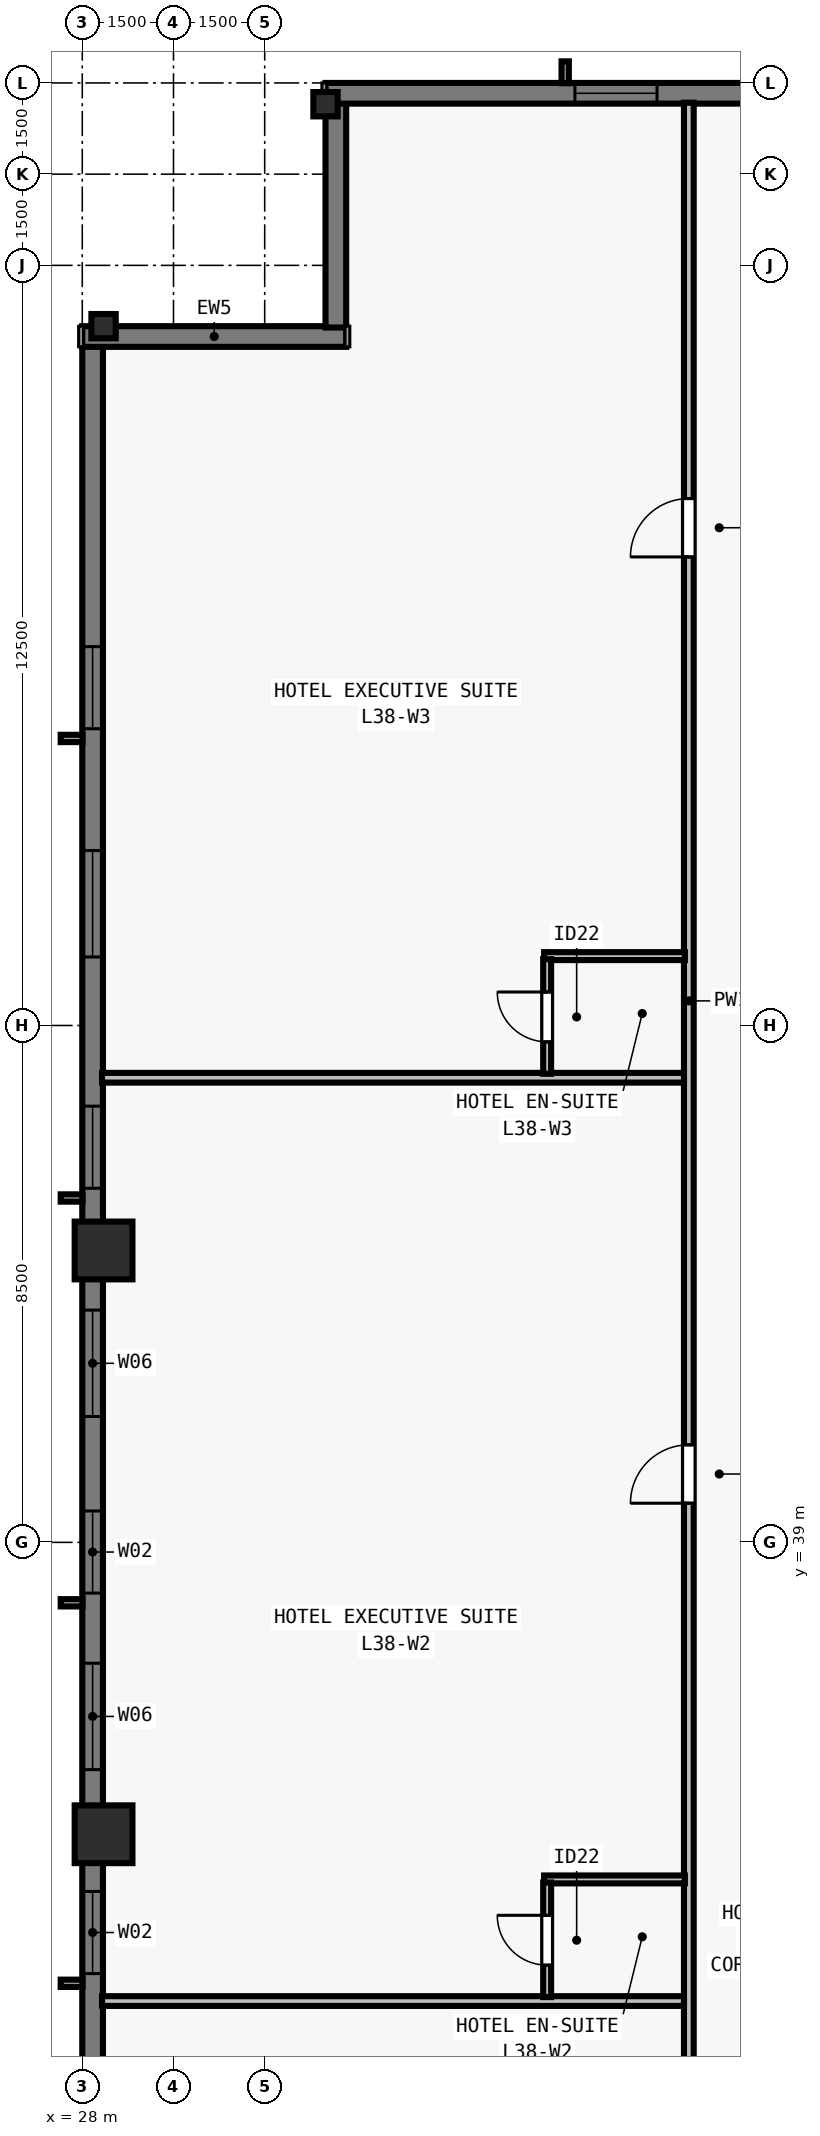
"""IFC4 building model, lengths in metres.
Left out: names, types, materials, properties, quantities, classifications, styles, units other than length and angle.
Written with IfcOpenShell. Run it as: python <this file> out.ifc"""

import sys

from ifc_helpers import new_model, si_unit, direction, frame, frame_2d, origin, origin_2d, place, context, subcontext, project, spatial, rectangle, i_section, extrude, element, fill, save


model = new_model("IFC4")
c1 = context("Model", 3, precision=1e-05, world=origin(), true_north=direction((0.0, 1.0)))
c2 = subcontext(c1, "Body", "Model", "MODEL_VIEW")
j1 = project(units=[si_unit("LENGTHUNIT", "METRE"), si_unit("PLANEANGLEUNIT", "RADIAN")], contexts=[c1])
p1 = place(None, origin())
s1 = spatial("IfcSite", under=j1, at=p1, CompositionType="ELEMENT")
p2 = place(p1, origin())
s2 = spatial("IfcBuilding", under=s1, at=p2, CompositionType="ELEMENT")
p3 = place(p2, frame((0.0, 0.0, 141.0)))
s3 = spatial("IfcBuildingStorey", under=s2, at=p3, CompositionType="ELEMENT", Elevation=141.0)
for number, where, z_axis, x_axis in (
    (1, (32.0, 62.65, 0.0), (0.0, 0.0, 1.0), (1.0, 0.0, 0.0)),
    (2, (28.35, 59.0, 0.0), (0.0, 0.0, 1.0), (0.0, 1.0, 0.0)),
):
    element("IfcColumn", number, at=place(p3, frame(where, z_axis=z_axis, x_axis=x_axis)), inside=s3, PredefinedType="COLUMN", context=c2, shape_type="SweptSolid", body=[
        extrude(i_section(OverallWidth=0.4, OverallDepth=0.4, WebThickness=0.022, FlangeThickness=0.036, at=origin_2d()), origin(), (0.0, 0.0, 1.0), 3.5),
    ])
for number, where, z_axis, x_axis in (
    (3, (28.35, 43.8, 0.0), (0.0, 0.0, 1.0), (0.0, 1.0, 0.0)),
    (4, (28.35, 34.2, 0.0), (0.0, 0.0, 1.0), (0.0, 1.0, 0.0)),
):
    element("IfcColumn", number, at=place(p3, frame(where, z_axis=z_axis, x_axis=x_axis)), inside=s3, PredefinedType="COLUMN", context=c2, shape_type="SweptSolid", body=[
        extrude(rectangle(XDim=0.95, YDim=0.95, at=origin_2d()), origin(), (0.0, 0.0, 1.0), 3.5),
    ])
p4 = place(p3, frame((28.17, 19.0, 0.0), z_axis=(0.0, 0.0, 1.0), x_axis=(0.0, 1.0, 0.0)))
e5 = element("IfcWall", 5, at=p4, inside=s3, PredefinedType="SOLIDWALL", context=c2, shape_type="SweptSolid", body=[
    extrude(rectangle(XDim=39.682, YDim=0.34, at=frame_2d((19.841, 0.0))), origin(), (0.0, 0.0, 1.0), 3.28),
])
p5 = place(p4, frame((4.952, 0.0, 0.8)))
e6 = element("IfcOpeningElement", 6, at=p5, cuts=e5, PredefinedType="OPENING", context=c2, shape_type="SweptSolid", body=[
    extrude(rectangle(XDim=1.35, YDim=1.66, at=frame_2d((0.675, 0.83))), frame((0.0, 0.18, 0.0), z_axis=(0.0, -1.0, 0.0), x_axis=(1.0, 0.0, 0.0)), (0.0, 0.0, 1.0), 0.36),
])
p6 = place(p4, frame((8.305, 0.0, 0.8)))
e7 = element("IfcOpeningElement", 7, at=p6, cuts=e5, PredefinedType="OPENING", context=c2, shape_type="SweptSolid", body=[
    extrude(rectangle(XDim=1.75, YDim=1.66, at=frame_2d((0.875, 0.83))), frame((0.0, 0.18, 0.0), z_axis=(0.0, -1.0, 0.0), x_axis=(1.0, 0.0, 0.0)), (0.0, 0.0, 1.0), 0.36),
])
p7 = place(p4, frame((12.909, 0.0, 0.8)))
e8 = element("IfcOpeningElement", 8, at=p7, cuts=e5, PredefinedType="OPENING", context=c2, shape_type="SweptSolid", body=[
    extrude(rectangle(XDim=1.35, YDim=1.66, at=frame_2d((0.675, 0.83))), frame((0.0, 0.18, 0.0), z_axis=(0.0, -1.0, 0.0), x_axis=(1.0, 0.0, 0.0)), (0.0, 0.0, 1.0), 0.36),
])
p8 = place(p4, frame((16.262, 0.0, 0.8)))
e9 = element("IfcOpeningElement", 9, at=p8, cuts=e5, PredefinedType="OPENING", context=c2, shape_type="SweptSolid", body=[
    extrude(rectangle(XDim=1.75, YDim=1.66, at=frame_2d((0.875, 0.83))), frame((0.0, 0.18, 0.0), z_axis=(0.0, -1.0, 0.0), x_axis=(1.0, 0.0, 0.0)), (0.0, 0.0, 1.0), 0.36),
])
p9 = place(p4, frame((19.166, 0.0, 0.8)))
e10 = element("IfcOpeningElement", 10, at=p9, cuts=e5, PredefinedType="OPENING", context=c2, shape_type="SweptSolid", body=[
    extrude(rectangle(XDim=1.35, YDim=1.66, at=frame_2d((0.675, 0.83))), frame((0.0, 0.18, 0.0), z_axis=(0.0, -1.0, 0.0), x_axis=(1.0, 0.0, 0.0)), (0.0, 0.0, 1.0), 0.36),
])
p10 = place(p4, frame((22.07, 0.0, 0.8)))
e11 = element("IfcOpeningElement", 11, at=p10, cuts=e5, PredefinedType="OPENING", context=c2, shape_type="SweptSolid", body=[
    extrude(rectangle(XDim=1.75, YDim=1.66, at=frame_2d((0.875, 0.83))), frame((0.0, 0.18, 0.0), z_axis=(0.0, -1.0, 0.0), x_axis=(1.0, 0.0, 0.0)), (0.0, 0.0, 1.0), 0.36),
])
p11 = place(p4, frame((25.823, 0.0, 0.8)))
e12 = element("IfcOpeningElement", 12, at=p11, cuts=e5, PredefinedType="OPENING", context=c2, shape_type="SweptSolid", body=[
    extrude(rectangle(XDim=1.35, YDim=1.66, at=frame_2d((0.675, 0.83))), frame((0.0, 0.18, 0.0), z_axis=(0.0, -1.0, 0.0), x_axis=(1.0, 0.0, 0.0)), (0.0, 0.0, 1.0), 0.36),
])
p12 = place(p4, frame((29.627, 0.0, 0.8)))
e13 = element("IfcOpeningElement", 13, at=p12, cuts=e5, PredefinedType="OPENING", context=c2, shape_type="SweptSolid", body=[
    extrude(rectangle(XDim=1.75, YDim=1.66, at=frame_2d((0.875, 0.83))), frame((0.0, 0.18, 0.0), z_axis=(0.0, -1.0, 0.0), x_axis=(1.0, 0.0, 0.0)), (0.0, 0.0, 1.0), 0.36),
])
p13 = place(p4, frame((33.38, 0.0, 0.8)))
e14 = element("IfcOpeningElement", 14, at=p13, cuts=e5, PredefinedType="OPENING", context=c2, shape_type="SweptSolid", body=[
    extrude(rectangle(XDim=1.35, YDim=1.66, at=frame_2d((0.675, 0.83))), frame((0.0, 0.18, 0.0), z_axis=(0.0, -1.0, 0.0), x_axis=(1.0, 0.0, 0.0)), (0.0, 0.0, 1.0), 0.36),
])
p14 = place(p3, frame((28.0, 58.83, 0.0), z_axis=(0.0, 0.0, 1.0), x_axis=(1.0, 0.0, 0.0)))
e15 = element("IfcWall", 15, at=p14, inside=s3, PredefinedType="SOLIDWALL", context=c2, shape_type="SweptSolid", body=[
    extrude(rectangle(XDim=4.34, YDim=0.34, at=frame_2d((2.17, 0.0))), origin(), (0.0, 0.0, 1.0), 3.28),
])
p15 = place(p3, frame((32.17, 58.978, 0.0), z_axis=(0.0, 0.0, 1.0), x_axis=(0.0, 1.0, 0.0)))
e16 = element("IfcWall", 16, at=p15, inside=s3, PredefinedType="SOLIDWALL", context=c2, shape_type="SweptSolid", body=[
    extrude(rectangle(XDim=3.704, YDim=0.34, at=frame_2d((1.852, 0.0))), origin(), (0.0, 0.0, 1.0), 3.28),
])
p16 = place(p3, frame((32.0, 62.83, 0.0), z_axis=(0.0, 0.0, 1.0), x_axis=(1.0, 0.0, 0.0)))
e17 = element("IfcWall", 17, at=p16, inside=s3, PredefinedType="SOLIDWALL", context=c2, shape_type="SweptSolid", body=[
    extrude(rectangle(XDim=39.682, YDim=0.34, at=frame_2d((19.841, 0.0))), origin(), (0.0, 0.0, 1.0), 3.28),
])
p17 = place(p16, frame((4.102, 0.0, 0.8)))
e18 = element("IfcOpeningElement", 18, at=p17, cuts=e17, PredefinedType="OPENING", context=c2, shape_type="SweptSolid", body=[
    extrude(rectangle(XDim=1.35, YDim=1.66, at=frame_2d((0.675, 0.83))), frame((0.0, 0.18, 0.0), z_axis=(0.0, -1.0, 0.0), x_axis=(1.0, 0.0, 0.0)), (0.0, 0.0, 1.0), 0.36),
])
p18 = place(p16, frame((8.755, 0.0, 0.8)))
e19 = element("IfcOpeningElement", 19, at=p18, cuts=e17, PredefinedType="OPENING", context=c2, shape_type="SweptSolid", body=[
    extrude(rectangle(XDim=1.75, YDim=1.66, at=frame_2d((0.875, 0.83))), frame((0.0, 0.18, 0.0), z_axis=(0.0, -1.0, 0.0), x_axis=(1.0, 0.0, 0.0)), (0.0, 0.0, 1.0), 0.36),
])
p19 = place(p16, frame((12.059, 0.0, 0.8)))
e20 = element("IfcOpeningElement", 20, at=p19, cuts=e17, PredefinedType="OPENING", context=c2, shape_type="SweptSolid", body=[
    extrude(rectangle(XDim=1.35, YDim=1.66, at=frame_2d((0.675, 0.83))), frame((0.0, 0.18, 0.0), z_axis=(0.0, -1.0, 0.0), x_axis=(1.0, 0.0, 0.0)), (0.0, 0.0, 1.0), 0.36),
])
p20 = place(p16, frame((16.262, 0.0, 0.8)))
e21 = element("IfcOpeningElement", 21, at=p20, cuts=e17, PredefinedType="OPENING", context=c2, shape_type="SweptSolid", body=[
    extrude(rectangle(XDim=1.75, YDim=1.66, at=frame_2d((0.875, 0.83))), frame((0.0, 0.18, 0.0), z_axis=(0.0, -1.0, 0.0), x_axis=(1.0, 0.0, 0.0)), (0.0, 0.0, 1.0), 0.36),
])
p21 = place(p16, frame((18.316, 0.0, 0.8)))
e22 = element("IfcOpeningElement", 22, at=p21, cuts=e17, PredefinedType="OPENING", context=c2, shape_type="SweptSolid", body=[
    extrude(rectangle(XDim=1.35, YDim=1.66, at=frame_2d((0.675, 0.83))), frame((0.0, 0.18, 0.0), z_axis=(0.0, -1.0, 0.0), x_axis=(1.0, 0.0, 0.0)), (0.0, 0.0, 1.0), 0.36),
])
p22 = place(p16, frame((22.07, 0.0, 0.8)))
e23 = element("IfcOpeningElement", 23, at=p22, cuts=e17, PredefinedType="OPENING", context=c2, shape_type="SweptSolid", body=[
    extrude(rectangle(XDim=1.75, YDim=1.66, at=frame_2d((0.875, 0.83))), frame((0.0, 0.18, 0.0), z_axis=(0.0, -1.0, 0.0), x_axis=(1.0, 0.0, 0.0)), (0.0, 0.0, 1.0), 0.36),
])
p23 = place(p16, frame((26.273, 0.0, 0.8)))
e24 = element("IfcOpeningElement", 24, at=p23, cuts=e17, PredefinedType="OPENING", context=c2, shape_type="SweptSolid", body=[
    extrude(rectangle(XDim=1.35, YDim=1.66, at=frame_2d((0.675, 0.83))), frame((0.0, 0.18, 0.0), z_axis=(0.0, -1.0, 0.0), x_axis=(1.0, 0.0, 0.0)), (0.0, 0.0, 1.0), 0.36),
])
p24 = place(p16, frame((33.38, 0.0, 0.8)))
e25 = element("IfcOpeningElement", 25, at=p24, cuts=e17, PredefinedType="OPENING", context=c2, shape_type="SweptSolid", body=[
    extrude(rectangle(XDim=1.35, YDim=1.66, at=frame_2d((0.675, 0.83))), frame((0.0, 0.18, 0.0), z_axis=(0.0, -1.0, 0.0), x_axis=(1.0, 0.0, 0.0)), (0.0, 0.0, 1.0), 0.36),
])
p25 = place(p3, frame((37.975, 15.325, 0.0), z_axis=(0.0, 0.0, 1.0), x_axis=(0.0, 1.0, 0.0)))
e26 = element("IfcWall", 26, at=p25, inside=s3, PredefinedType="PARTITIONING", context=c2, shape_type="SweptSolid", body=[
    extrude(rectangle(XDim=47.35, YDim=0.16, at=frame_2d((23.675, 0.0))), origin(), (0.0, 0.0, 1.0), 2.555),
])
p26 = place(p25, frame((8.934, 0.0, 0.0)))
e27 = element("IfcOpeningElement", 27, at=p26, cuts=e26, PredefinedType="OPENING", context=c2, shape_type="SweptSolid", body=[
    extrude(rectangle(XDim=0.96, YDim=2.15, at=frame_2d((0.48, 1.075))), frame((0.0, 0.09, 0.0), z_axis=(0.0, -1.0, 0.0), x_axis=(1.0, 0.0, 0.0)), (0.0, 0.0, 1.0), 0.18),
])
p27 = place(p25, frame((24.319, 0.0, 0.0)))
e28 = element("IfcOpeningElement", 28, at=p27, cuts=e26, PredefinedType="OPENING", context=c2, shape_type="SweptSolid", body=[
    extrude(rectangle(XDim=0.96, YDim=2.15, at=frame_2d((0.48, 1.075))), frame((0.0, 0.09, 0.0), z_axis=(0.0, -1.0, 0.0), x_axis=(1.0, 0.0, 0.0)), (0.0, 0.0, 1.0), 0.18),
])
p28 = place(p25, frame((39.88, 0.0, 0.0)))
e29 = element("IfcOpeningElement", 29, at=p28, cuts=e26, PredefinedType="OPENING", context=c2, shape_type="SweptSolid", body=[
    extrude(rectangle(XDim=0.96, YDim=2.15, at=frame_2d((0.48, 1.075))), frame((0.0, 0.09, 0.0), z_axis=(0.0, -1.0, 0.0), x_axis=(1.0, 0.0, 0.0)), (0.0, 0.0, 1.0), 0.18),
])
p29 = place(p3, frame((28.325, 31.457, 0.0), z_axis=(0.0, 0.0, 1.0), x_axis=(1.0, 0.0, 0.0)))
e30 = element("IfcWall", 30, at=p29, inside=s3, PredefinedType="PARTITIONING", context=c2, shape_type="SweptSolid", body=[
    extrude(rectangle(XDim=9.57, YDim=0.16, at=frame_2d((4.785, 0.0))), origin(), (0.0, 0.0, 1.0), 3.28),
])
p30 = place(p3, frame((35.595, 33.457, 0.0), z_axis=(0.0, 0.0, 1.0), x_axis=(1.0, 0.0, 0.0)))
e31 = element("IfcWall", 31, at=p30, inside=s3, PredefinedType="PLUMBINGWALL", context=c2, shape_type="SweptSolid", body=[
    extrude(rectangle(XDim=2.315, YDim=0.13, at=frame_2d((1.157, 0.0))), origin(), (0.0, 0.0, 1.0), 3.28),
])
p31 = place(p3, frame((35.645, 31.522, 0.0), z_axis=(0.0, 0.0, 1.0), x_axis=(0.0, 1.0, 0.0)))
e32 = element("IfcWall", 32, at=p31, inside=s3, PredefinedType="PLUMBINGWALL", context=c2, shape_type="SweptSolid", body=[
    extrude(rectangle(XDim=1.885, YDim=0.13, at=frame_2d((0.942, 0.0))), origin(), (0.0, 0.0, 1.0), 3.28),
])
p32 = place(p31, frame((0.525, 0.0, 0.0)))
e33 = element("IfcOpeningElement", 33, at=p32, cuts=e32, PredefinedType="OPENING", context=c2, shape_type="SweptSolid", body=[
    extrude(rectangle(XDim=0.82, YDim=2.1, at=frame_2d((0.41, 1.05))), frame((0.0, 0.075, 0.0), z_axis=(0.0, -1.0, 0.0), x_axis=(1.0, 0.0, 0.0)), (0.0, 0.0, 1.0), 0.15),
])
p33 = place(p3, frame((28.325, 46.641, 0.0), z_axis=(0.0, 0.0, 1.0), x_axis=(1.0, 0.0, 0.0)))
e34 = element("IfcWall", 34, at=p33, inside=s3, PredefinedType="PARTITIONING", context=c2, shape_type="SweptSolid", body=[
    extrude(rectangle(XDim=9.57, YDim=0.16, at=frame_2d((4.785, 0.0))), origin(), (0.0, 0.0, 1.0), 3.28),
])
p34 = place(p3, frame((35.595, 48.641, 0.0), z_axis=(0.0, 0.0, 1.0), x_axis=(1.0, 0.0, 0.0)))
e35 = element("IfcWall", 35, at=p34, inside=s3, PredefinedType="PLUMBINGWALL", context=c2, shape_type="SweptSolid", body=[
    extrude(rectangle(XDim=2.315, YDim=0.13, at=frame_2d((1.157, 0.0))), origin(), (0.0, 0.0, 1.0), 3.28),
])
p35 = place(p3, frame((35.645, 46.706, 0.0), z_axis=(0.0, 0.0, 1.0), x_axis=(0.0, 1.0, 0.0)))
e36 = element("IfcWall", 36, at=p35, inside=s3, PredefinedType="PLUMBINGWALL", context=c2, shape_type="SweptSolid", body=[
    extrude(rectangle(XDim=1.885, YDim=0.13, at=frame_2d((0.942, 0.0))), origin(), (0.0, 0.0, 1.0), 3.28),
])
p36 = place(p35, frame((0.525, 0.0, 0.0)))
e37 = element("IfcOpeningElement", 37, at=p36, cuts=e36, PredefinedType="OPENING", context=c2, shape_type="SweptSolid", body=[
    extrude(rectangle(XDim=0.82, YDim=2.1, at=frame_2d((0.41, 1.05))), frame((0.0, 0.075, 0.0), z_axis=(0.0, -1.0, 0.0), x_axis=(1.0, 0.0, 0.0)), (0.0, 0.0, 1.0), 0.15),
])
p37 = place(p7, origin())
e38 = element("IfcWindow", 38, at=p37, inside=s3, PartitioningType="SINGLE_PANEL", PredefinedType="WINDOW", context=c2, shape_type="SweptSolid", body=[
    extrude(rectangle(XDim=1.35, YDim=1.66, at=frame_2d((0.675, 0.83))), frame((0.0, -0.05, 0.0), z_axis=(0.0, -1.0, 0.0), x_axis=(1.0, 0.0, 0.0)), (0.0, 0.0, 1.0), 0.06),
])
fill(e8, e38)
p38 = place(p8, origin())
e39 = element("IfcWindow", 39, at=p38, inside=s3, PartitioningType="SINGLE_PANEL", PredefinedType="WINDOW", context=c2, shape_type="SweptSolid", body=[
    extrude(rectangle(XDim=1.75, YDim=1.66, at=frame_2d((0.875, 0.83))), frame((0.0, -0.05, 0.0), z_axis=(0.0, -1.0, 0.0), x_axis=(1.0, 0.0, 0.0)), (0.0, 0.0, 1.0), 0.06),
])
fill(e9, e39)
p39 = place(p9, origin())
e40 = element("IfcWindow", 40, at=p39, inside=s3, PartitioningType="SINGLE_PANEL", PredefinedType="WINDOW", context=c2, shape_type="SweptSolid", body=[
    extrude(rectangle(XDim=1.35, YDim=1.66, at=frame_2d((0.675, 0.83))), frame((0.0, -0.05, 0.0), z_axis=(0.0, -1.0, 0.0), x_axis=(1.0, 0.0, 0.0)), (0.0, 0.0, 1.0), 0.06),
])
fill(e10, e40)
p40 = place(p10, origin())
e41 = element("IfcWindow", 41, at=p40, inside=s3, PartitioningType="SINGLE_PANEL", PredefinedType="WINDOW", context=c2, shape_type="SweptSolid", body=[
    extrude(rectangle(XDim=1.75, YDim=1.66, at=frame_2d((0.875, 0.83))), frame((0.0, -0.05, 0.0), z_axis=(0.0, -1.0, 0.0), x_axis=(1.0, 0.0, 0.0)), (0.0, 0.0, 1.0), 0.06),
])
fill(e11, e41)
p41 = place(p11, origin())
e42 = element("IfcWindow", 42, at=p41, inside=s3, PartitioningType="SINGLE_PANEL", PredefinedType="WINDOW", context=c2, shape_type="SweptSolid", body=[
    extrude(rectangle(XDim=1.35, YDim=1.66, at=frame_2d((0.675, 0.83))), frame((0.0, -0.05, 0.0), z_axis=(0.0, -1.0, 0.0), x_axis=(1.0, 0.0, 0.0)), (0.0, 0.0, 1.0), 0.06),
])
fill(e12, e42)
p42 = place(p12, origin())
e43 = element("IfcWindow", 43, at=p42, inside=s3, PartitioningType="SINGLE_PANEL", PredefinedType="WINDOW", context=c2, shape_type="SweptSolid", body=[
    extrude(rectangle(XDim=1.75, YDim=1.66, at=frame_2d((0.875, 0.83))), frame((0.0, -0.05, 0.0), z_axis=(0.0, -1.0, 0.0), x_axis=(1.0, 0.0, 0.0)), (0.0, 0.0, 1.0), 0.06),
])
fill(e13, e43)
p43 = place(p13, origin())
e44 = element("IfcWindow", 44, at=p43, inside=s3, PartitioningType="SINGLE_PANEL", PredefinedType="WINDOW", context=c2, shape_type="SweptSolid", body=[
    extrude(rectangle(XDim=1.35, YDim=1.66, at=frame_2d((0.675, 0.83))), frame((0.0, -0.05, 0.0), z_axis=(0.0, -1.0, 0.0), x_axis=(1.0, 0.0, 0.0)), (0.0, 0.0, 1.0), 0.06),
])
fill(e14, e44)
p44 = place(p17, origin())
e45 = element("IfcWindow", 45, at=p44, inside=s3, PartitioningType="SINGLE_PANEL", PredefinedType="WINDOW", context=c2, shape_type="SweptSolid", body=[
    extrude(rectangle(XDim=1.35, YDim=1.66, at=frame_2d((0.675, 0.83))), frame((0.0, -0.05, 0.0), z_axis=(0.0, -1.0, 0.0), x_axis=(1.0, 0.0, 0.0)), (0.0, 0.0, 1.0), 0.06),
])
fill(e18, e45)
p45 = place(p32, origin())
e46 = element("IfcDoor", 46, at=p45, inside=s3, OperationType="SINGLE_SWING_RIGHT", PredefinedType="DOOR", context=c2, shape_type="SweptSolid", body=[
    extrude(rectangle(XDim=0.82, YDim=2.1, at=frame_2d((0.41, 1.05))), frame((0.0, 0.025, 0.0), z_axis=(0.0, -1.0, 0.0), x_axis=(1.0, 0.0, 0.0)), (0.0, 0.0, 1.0), 0.05),
])
fill(e33, e46)
p46 = place(p27, origin())
e47 = element("IfcDoor", 47, at=p46, inside=s3, OperationType="SINGLE_SWING_LEFT", PredefinedType="DOOR", context=c2, shape_type="SweptSolid", body=[
    extrude(rectangle(XDim=0.96, YDim=2.15, at=frame_2d((0.48, 1.075))), frame((0.0, 0.025, 0.0), z_axis=(0.0, -1.0, 0.0), x_axis=(1.0, 0.0, 0.0)), (0.0, 0.0, 1.0), 0.05),
])
fill(e28, e47)
p47 = place(p36, origin())
e48 = element("IfcDoor", 48, at=p47, inside=s3, OperationType="SINGLE_SWING_RIGHT", PredefinedType="DOOR", context=c2, shape_type="SweptSolid", body=[
    extrude(rectangle(XDim=0.82, YDim=2.1, at=frame_2d((0.41, 1.05))), frame((0.0, 0.025, 0.0), z_axis=(0.0, -1.0, 0.0), x_axis=(1.0, 0.0, 0.0)), (0.0, 0.0, 1.0), 0.05),
])
fill(e37, e48)
p48 = place(p28, origin())
e49 = element("IfcDoor", 49, at=p48, inside=s3, OperationType="SINGLE_SWING_LEFT", PredefinedType="DOOR", context=c2, shape_type="SweptSolid", body=[
    extrude(rectangle(XDim=0.96, YDim=2.15, at=frame_2d((0.48, 1.075))), frame((0.0, 0.025, 0.0), z_axis=(0.0, -1.0, 0.0), x_axis=(1.0, 0.0, 0.0)), (0.0, 0.0, 1.0), 0.05),
])
fill(e29, e49)
save(model, sys.argv[1])
